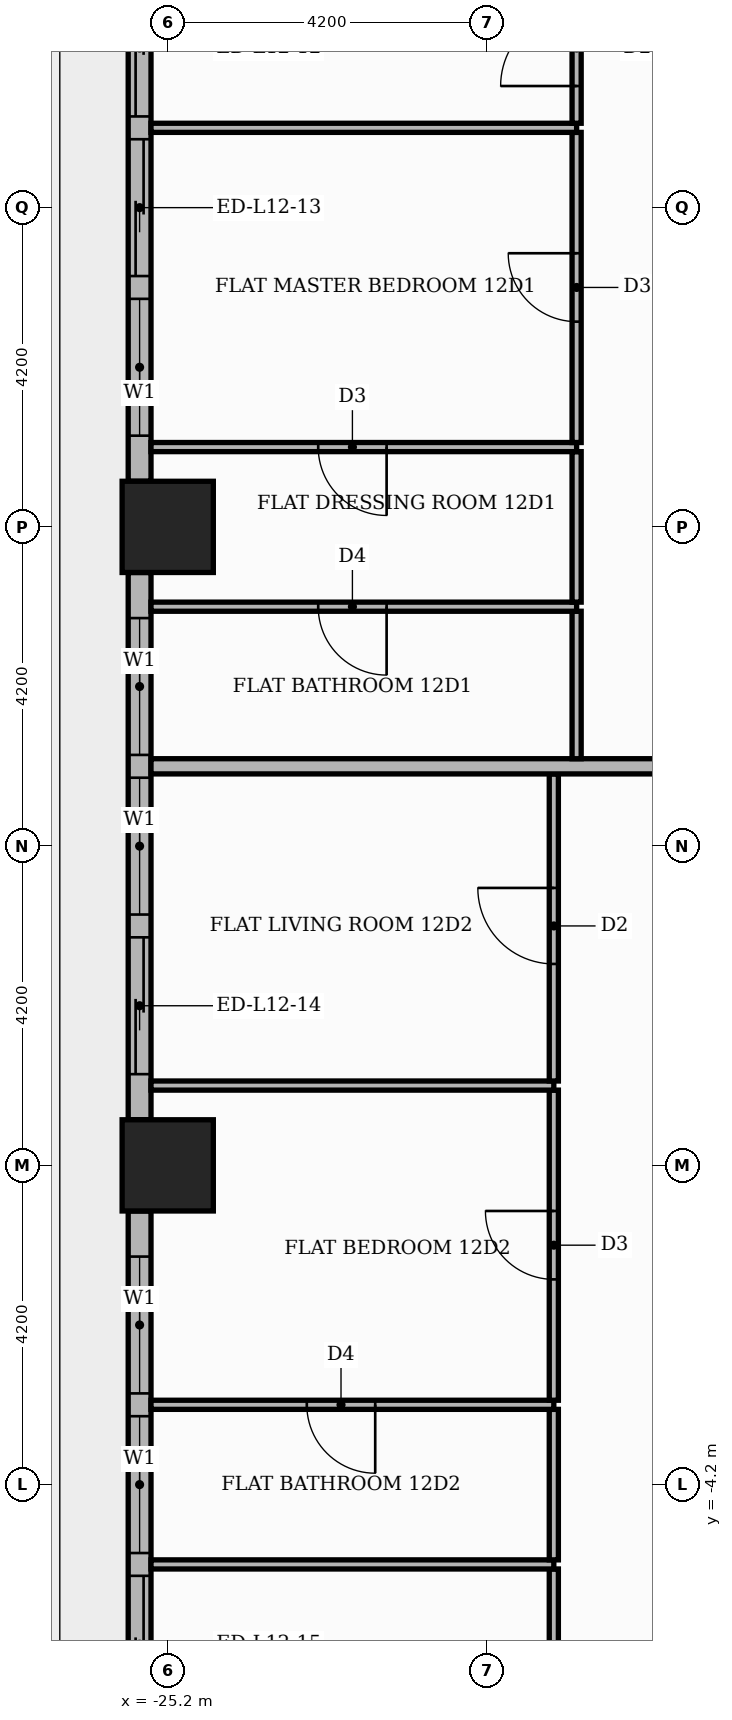
"""IFC4 building model, lengths in metres.
Left out: names, types, materials, properties, quantities, classifications, styles, units other than length and angle.
Written with IfcOpenShell. Run it as: python <this file> out.ifc"""

import sys

from ifc_helpers import new_model, si_unit, direction, frame, frame_2d, origin, origin_2d, place, context, subcontext, project, spatial, rectangle, extrude, element, fill, save


model = new_model("IFC4")
c1 = context("Model", 3, precision=1e-05, world=origin(), true_north=direction((0.0, 1.0)))
c2 = subcontext(c1, "Body", "Model", "MODEL_VIEW")
j1 = project(units=[si_unit("LENGTHUNIT", "METRE"), si_unit("PLANEANGLEUNIT", "RADIAN")], contexts=[c1])
p1 = place(None, origin())
s1 = spatial("IfcSite", under=j1, at=p1, CompositionType="ELEMENT")
p2 = place(p1, origin())
s2 = spatial("IfcBuilding", under=s1, at=p2, CompositionType="ELEMENT")
p3 = place(p2, frame((0.0, 0.0, 54.3)))
s3 = spatial("IfcBuildingStorey", under=s2, at=p3, CompositionType="ELEMENT", Elevation=54.3)
for number, where, z_axis, x_axis in (
    (1, (-25.2, 0.0, 0.0), (0.0, 0.0, 1.0), (1.0, 0.0, 0.0)),
    (2, (-25.2, 8.4, 0.0), (0.0, 0.0, 1.0), (1.0, 0.0, 0.0)),
):
    element("IfcColumn", number, at=place(p3, frame(where, z_axis=z_axis, x_axis=x_axis)), inside=s3, PredefinedType="COLUMN", context=c2, shape_type="SweptSolid", body=[
        extrude(rectangle(XDim=1.2, YDim=1.2, at=origin_2d()), origin(), (0.0, 0.0, 1.0), 3.9),
    ])
p4 = place(p3, frame((-25.57, 16.2, 0.0), z_axis=(0.0, 0.0, 1.0), x_axis=(0.0, -1.0, 0.0)))
e3 = element("IfcWall", 3, at=p4, inside=s3, PredefinedType="STANDARD", context=c2, shape_type="SweptSolid", body=[
    extrude(rectangle(XDim=7.2, YDim=0.3, at=frame_2d((3.6, 0.0))), origin(), (0.0, 0.0, 1.0), 3.48),
])
p5 = place(p4, frame((0.6, 0.0, 0.0)))
e4 = element("IfcOpeningElement", 4, at=p5, cuts=e3, PredefinedType="OPENING", context=c2, shape_type="SweptSolid", body=[
    extrude(rectangle(XDim=1.8, YDim=2.4, at=frame_2d((0.9, 1.2))), frame((0.0, 0.16, 0.0), z_axis=(0.0, -1.0, 0.0), x_axis=(1.0, 0.0, 0.0)), (0.0, 0.0, 1.0), 0.32),
])
p6 = place(p4, frame((2.7, 0.0, 0.0)))
e5 = element("IfcOpeningElement", 5, at=p6, cuts=e3, PredefinedType="OPENING", context=c2, shape_type="SweptSolid", body=[
    extrude(rectangle(XDim=1.8, YDim=2.4, at=frame_2d((0.9, 1.2))), frame((0.0, 0.16, 0.0), z_axis=(0.0, -1.0, 0.0), x_axis=(1.0, 0.0, 0.0)), (0.0, 0.0, 1.0), 0.32),
])
p7 = place(p4, frame((4.8, 0.0, 0.9)))
e6 = element("IfcOpeningElement", 6, at=p7, cuts=e3, PredefinedType="OPENING", context=c2, shape_type="SweptSolid", body=[
    extrude(rectangle(XDim=1.8, YDim=2.1, at=frame_2d((0.9, 1.05))), frame((0.0, 0.16, 0.0), z_axis=(0.0, -1.0, 0.0), x_axis=(1.0, 0.0, 0.0)), (0.0, 0.0, 1.0), 0.32),
])
p8 = place(p3, frame((-25.57, 7.8, 0.0), z_axis=(0.0, 0.0, 1.0), x_axis=(0.0, -1.0, 0.0)))
e7 = element("IfcWall", 7, at=p8, inside=s3, PredefinedType="STANDARD", context=c2, shape_type="SweptSolid", body=[
    extrude(rectangle(XDim=7.2, YDim=0.3, at=frame_2d((3.6, 0.0))), origin(), (0.0, 0.0, 1.0), 3.48),
])
p9 = place(p8, frame((0.6, 0.0, 0.9)))
e8 = element("IfcOpeningElement", 8, at=p9, cuts=e7, PredefinedType="OPENING", context=c2, shape_type="SweptSolid", body=[
    extrude(rectangle(XDim=1.8, YDim=2.1, at=frame_2d((0.9, 1.05))), frame((0.0, 0.16, 0.0), z_axis=(0.0, -1.0, 0.0), x_axis=(1.0, 0.0, 0.0)), (0.0, 0.0, 1.0), 0.32),
])
p10 = place(p8, frame((2.7, 0.0, 0.9)))
e9 = element("IfcOpeningElement", 9, at=p10, cuts=e7, PredefinedType="OPENING", context=c2, shape_type="SweptSolid", body=[
    extrude(rectangle(XDim=1.8, YDim=2.1, at=frame_2d((0.9, 1.05))), frame((0.0, 0.16, 0.0), z_axis=(0.0, -1.0, 0.0), x_axis=(1.0, 0.0, 0.0)), (0.0, 0.0, 1.0), 0.32),
])
p11 = place(p8, frame((4.8, 0.0, 0.0)))
e10 = element("IfcOpeningElement", 10, at=p11, cuts=e7, PredefinedType="OPENING", context=c2, shape_type="SweptSolid", body=[
    extrude(rectangle(XDim=1.8, YDim=2.4, at=frame_2d((0.9, 1.2))), frame((0.0, 0.16, 0.0), z_axis=(0.0, -1.0, 0.0), x_axis=(1.0, 0.0, 0.0)), (0.0, 0.0, 1.0), 0.32),
])
p12 = place(p3, frame((-25.57, -0.6, 0.0), z_axis=(0.0, 0.0, 1.0), x_axis=(0.0, -1.0, 0.0)))
e11 = element("IfcWall", 11, at=p12, inside=s3, PredefinedType="STANDARD", context=c2, shape_type="SweptSolid", body=[
    extrude(rectangle(XDim=7.2, YDim=0.3, at=frame_2d((3.6, 0.0))), origin(), (0.0, 0.0, 1.0), 3.48),
])
p13 = place(p12, frame((0.6, 0.0, 0.9)))
e12 = element("IfcOpeningElement", 12, at=p13, cuts=e11, PredefinedType="OPENING", context=c2, shape_type="SweptSolid", body=[
    extrude(rectangle(XDim=1.8, YDim=2.1, at=frame_2d((0.9, 1.05))), frame((0.0, 0.16, 0.0), z_axis=(0.0, -1.0, 0.0), x_axis=(1.0, 0.0, 0.0)), (0.0, 0.0, 1.0), 0.32),
])
p14 = place(p12, frame((2.7, 0.0, 0.9)))
e13 = element("IfcOpeningElement", 13, at=p14, cuts=e11, PredefinedType="OPENING", context=c2, shape_type="SweptSolid", body=[
    extrude(rectangle(XDim=1.8, YDim=2.1, at=frame_2d((0.9, 1.05))), frame((0.0, 0.16, 0.0), z_axis=(0.0, -1.0, 0.0), x_axis=(1.0, 0.0, 0.0)), (0.0, 0.0, 1.0), 0.32),
])
p15 = place(p12, frame((4.8, 0.0, 0.0)))
e14 = element("IfcOpeningElement", 14, at=p15, cuts=e11, PredefinedType="OPENING", context=c2, shape_type="SweptSolid", body=[
    extrude(rectangle(XDim=1.8, YDim=2.4, at=frame_2d((0.9, 1.2))), frame((0.0, 0.16, 0.0), z_axis=(0.0, -1.0, 0.0), x_axis=(1.0, 0.0, 0.0)), (0.0, 0.0, 1.0), 0.32),
])
p16 = place(p3, frame((-20.12, -9.39, 0.0), z_axis=(0.0, 0.0, 1.0), x_axis=(0.0, 1.0, 0.0)))
e15 = element("IfcWall", 15, at=p16, inside=s3, PredefinedType="PARTITIONING", context=c2, shape_type="SweptSolid", body=[
    extrude(rectangle(XDim=4.08, YDim=0.12, at=frame_2d((2.04, 0.0))), origin(), (0.0, 0.0, 1.0), 3.48),
])
p17 = place(p16, frame((1.59, 0.0, 0.0)))
e16 = element("IfcOpeningElement", 16, at=p17, cuts=e15, PredefinedType="OPENING", context=c2, shape_type="SweptSolid", body=[
    extrude(rectangle(XDim=0.9, YDim=2.1, at=frame_2d((0.45, 1.05))), frame((0.0, 0.07, 0.0), z_axis=(0.0, -1.0, 0.0), x_axis=(1.0, 0.0, 0.0)), (0.0, 0.0, 1.0), 0.14),
])
p18 = place(p3, frame((-25.42, -5.25, 0.0), z_axis=(0.0, 0.0, 1.0), x_axis=(1.0, 0.0, 0.0)))
e17 = element("IfcWall", 17, at=p18, inside=s3, PredefinedType="PARTITIONING", context=c2, shape_type="SweptSolid", body=[
    extrude(rectangle(XDim=5.3, YDim=0.12, at=frame_2d((2.65, 0.0))), origin(), (0.0, 0.0, 1.0), 3.48),
])
p19 = place(p3, frame((-20.12, -5.19, 0.0), z_axis=(0.0, 0.0, 1.0), x_axis=(0.0, 1.0, 0.0)))
e18 = element("IfcWall", 18, at=p19, inside=s3, PredefinedType="PARTITIONING", context=c2, shape_type="SweptSolid", body=[
    extrude(rectangle(XDim=1.98, YDim=0.12, at=frame_2d((0.99, 0.0))), origin(), (0.0, 0.0, 1.0), 3.48),
])
p20 = place(p3, frame((-25.42, -3.15, 0.0), z_axis=(0.0, 0.0, 1.0), x_axis=(1.0, 0.0, 0.0)))
e19 = element("IfcWall", 19, at=p20, inside=s3, PredefinedType="PARTITIONING", context=c2, shape_type="SweptSolid", body=[
    extrude(rectangle(XDim=5.3, YDim=0.12, at=frame_2d((2.65, 0.0))), origin(), (0.0, 0.0, 1.0), 3.48),
])
p21 = place(p20, frame((2.05, 0.0, 0.0)))
e20 = element("IfcOpeningElement", 20, at=p21, cuts=e19, PredefinedType="OPENING", context=c2, shape_type="SweptSolid", body=[
    extrude(rectangle(XDim=0.9, YDim=2.1, at=frame_2d((0.45, 1.05))), frame((0.0, 0.07, 0.0), z_axis=(0.0, -1.0, 0.0), x_axis=(1.0, 0.0, 0.0)), (0.0, 0.0, 1.0), 0.14),
])
p22 = place(p3, frame((-20.12, -3.09, 0.0), z_axis=(0.0, 0.0, 1.0), x_axis=(0.0, 1.0, 0.0)))
e21 = element("IfcWall", 21, at=p22, inside=s3, PredefinedType="PARTITIONING", context=c2, shape_type="SweptSolid", body=[
    extrude(rectangle(XDim=4.08, YDim=0.12, at=frame_2d((2.04, 0.0))), origin(), (0.0, 0.0, 1.0), 3.48),
])
p23 = place(p22, frame((1.59, 0.0, 0.0)))
e22 = element("IfcOpeningElement", 22, at=p23, cuts=e21, PredefinedType="OPENING", context=c2, shape_type="SweptSolid", body=[
    extrude(rectangle(XDim=0.9, YDim=2.1, at=frame_2d((0.45, 1.05))), frame((0.0, 0.07, 0.0), z_axis=(0.0, -1.0, 0.0), x_axis=(1.0, 0.0, 0.0)), (0.0, 0.0, 1.0), 0.14),
])
p24 = place(p3, frame((-25.42, 1.05, 0.0), z_axis=(0.0, 0.0, 1.0), x_axis=(1.0, 0.0, 0.0)))
e23 = element("IfcWall", 23, at=p24, inside=s3, PredefinedType="PARTITIONING", context=c2, shape_type="SweptSolid", body=[
    extrude(rectangle(XDim=5.3, YDim=0.12, at=frame_2d((2.65, 0.0))), origin(), (0.0, 0.0, 1.0), 3.48),
])
p25 = place(p3, frame((-20.12, 1.11, 0.0), z_axis=(0.0, 0.0, 1.0), x_axis=(0.0, 1.0, 0.0)))
e24 = element("IfcWall", 24, at=p25, inside=s3, PredefinedType="PARTITIONING", context=c2, shape_type="SweptSolid", body=[
    extrude(rectangle(XDim=4.04, YDim=0.12, at=frame_2d((2.02, 0.0))), origin(), (0.0, 0.0, 1.0), 3.48),
])
p26 = place(p25, frame((1.54, 0.0, 0.0)))
e25 = element("IfcOpeningElement", 25, at=p26, cuts=e24, PredefinedType="OPENING", context=c2, shape_type="SweptSolid", body=[
    extrude(rectangle(XDim=1.0, YDim=2.1, at=frame_2d((0.5, 1.05))), frame((0.0, 0.07, 0.0), z_axis=(0.0, -1.0, 0.0), x_axis=(1.0, 0.0, 0.0)), (0.0, 0.0, 1.0), 0.14),
])
p27 = place(p3, frame((-25.42, 5.25, 0.0), z_axis=(0.0, 0.0, 1.0), x_axis=(1.0, 0.0, 0.0)))
e26 = element("IfcWall", 26, at=p27, inside=s3, PredefinedType="PARTITIONING", context=c2, shape_type="SweptSolid", body=[
    extrude(rectangle(XDim=11.77, YDim=0.2, at=frame_2d((5.885, 0.0))), origin(), (0.0, 0.0, 1.0), 3.48),
])
p28 = place(p3, frame((-19.82, 5.35, 0.0), z_axis=(0.0, 0.0, 1.0), x_axis=(0.0, 1.0, 0.0)))
e27 = element("IfcWall", 27, at=p28, inside=s3, PredefinedType="PARTITIONING", context=c2, shape_type="SweptSolid", body=[
    extrude(rectangle(XDim=1.94, YDim=0.12, at=frame_2d((0.97, 0.0))), origin(), (0.0, 0.0, 1.0), 3.48),
])
p29 = place(p3, frame((-25.42, 7.35, 0.0), z_axis=(0.0, 0.0, 1.0), x_axis=(1.0, 0.0, 0.0)))
e28 = element("IfcWall", 28, at=p29, inside=s3, PredefinedType="PARTITIONING", context=c2, shape_type="SweptSolid", body=[
    extrude(rectangle(XDim=5.6, YDim=0.12, at=frame_2d((2.8, 0.0))), origin(), (0.0, 0.0, 1.0), 3.48),
])
p30 = place(p29, frame((2.2, 0.0, 0.0)))
e29 = element("IfcOpeningElement", 29, at=p30, cuts=e28, PredefinedType="OPENING", context=c2, shape_type="SweptSolid", body=[
    extrude(rectangle(XDim=0.9, YDim=2.1, at=frame_2d((0.45, 1.05))), frame((0.0, 0.07, 0.0), z_axis=(0.0, -1.0, 0.0), x_axis=(1.0, 0.0, 0.0)), (0.0, 0.0, 1.0), 0.14),
])
p31 = place(p3, frame((-19.82, 7.41, 0.0), z_axis=(0.0, 0.0, 1.0), x_axis=(0.0, 1.0, 0.0)))
e30 = element("IfcWall", 30, at=p31, inside=s3, PredefinedType="PARTITIONING", context=c2, shape_type="SweptSolid", body=[
    extrude(rectangle(XDim=1.98, YDim=0.12, at=frame_2d((0.99, 0.0))), origin(), (0.0, 0.0, 1.0), 3.48),
])
p32 = place(p3, frame((-25.42, 9.45, 0.0), z_axis=(0.0, 0.0, 1.0), x_axis=(1.0, 0.0, 0.0)))
e31 = element("IfcWall", 31, at=p32, inside=s3, PredefinedType="PARTITIONING", context=c2, shape_type="SweptSolid", body=[
    extrude(rectangle(XDim=5.6, YDim=0.12, at=frame_2d((2.8, 0.0))), origin(), (0.0, 0.0, 1.0), 3.48),
])
p33 = place(p32, frame((2.2, 0.0, 0.0)))
e32 = element("IfcOpeningElement", 32, at=p33, cuts=e31, PredefinedType="OPENING", context=c2, shape_type="SweptSolid", body=[
    extrude(rectangle(XDim=0.9, YDim=2.1, at=frame_2d((0.45, 1.05))), frame((0.0, 0.07, 0.0), z_axis=(0.0, -1.0, 0.0), x_axis=(1.0, 0.0, 0.0)), (0.0, 0.0, 1.0), 0.14),
])
p34 = place(p3, frame((-19.82, 9.51, 0.0), z_axis=(0.0, 0.0, 1.0), x_axis=(0.0, 1.0, 0.0)))
e33 = element("IfcWall", 33, at=p34, inside=s3, PredefinedType="PARTITIONING", context=c2, shape_type="SweptSolid", body=[
    extrude(rectangle(XDim=4.08, YDim=0.12, at=frame_2d((2.04, 0.0))), origin(), (0.0, 0.0, 1.0), 3.48),
])
p35 = place(p34, frame((1.59, 0.0, 0.0)))
e34 = element("IfcOpeningElement", 34, at=p35, cuts=e33, PredefinedType="OPENING", context=c2, shape_type="SweptSolid", body=[
    extrude(rectangle(XDim=0.9, YDim=2.1, at=frame_2d((0.45, 1.05))), frame((0.0, 0.07, 0.0), z_axis=(0.0, -1.0, 0.0), x_axis=(1.0, 0.0, 0.0)), (0.0, 0.0, 1.0), 0.14),
])
p36 = place(p3, frame((-25.42, 13.65, 0.0), z_axis=(0.0, 0.0, 1.0), x_axis=(1.0, 0.0, 0.0)))
e35 = element("IfcWall", 35, at=p36, inside=s3, PredefinedType="PARTITIONING", context=c2, shape_type="SweptSolid", body=[
    extrude(rectangle(XDim=5.6, YDim=0.12, at=frame_2d((2.8, 0.0))), origin(), (0.0, 0.0, 1.0), 3.48),
])
p37 = place(p3, frame((-19.82, 13.71, 0.0), z_axis=(0.0, 0.0, 1.0), x_axis=(0.0, 1.0, 0.0)))
e36 = element("IfcWall", 36, at=p37, inside=s3, PredefinedType="PARTITIONING", context=c2, shape_type="SweptSolid", body=[
    extrude(rectangle(XDim=1.98, YDim=0.12, at=frame_2d((0.99, 0.0))), origin(), (0.0, 0.0, 1.0), 3.48),
])
p38 = place(p37, frame((0.49, 0.0, 0.0)))
e37 = element("IfcOpeningElement", 37, at=p38, cuts=e36, PredefinedType="OPENING", context=c2, shape_type="SweptSolid", body=[
    extrude(rectangle(XDim=1.0, YDim=2.1, at=frame_2d((0.5, 1.05))), frame((0.0, 0.07, 0.0), z_axis=(0.0, -1.0, 0.0), x_axis=(1.0, 0.0, 0.0)), (0.0, 0.0, 1.0), 0.14),
])
p39 = place(p5, origin())
e38 = element("IfcDoor", 38, at=p39, inside=s3, OperationType="SLIDING_TO_LEFT", PredefinedType="DOOR", context=c2, shape_type="SweptSolid", body=[
    extrude(rectangle(XDim=1.8, YDim=2.4, at=frame_2d((0.9, 1.2))), frame((0.0, 0.025, 0.0), z_axis=(0.0, -1.0, 0.0), x_axis=(1.0, 0.0, 0.0)), (0.0, 0.0, 1.0), 0.05),
])
fill(e4, e38)
p40 = place(p6, origin())
e39 = element("IfcDoor", 39, at=p40, inside=s3, OperationType="SLIDING_TO_RIGHT", PredefinedType="DOOR", context=c2, shape_type="SweptSolid", body=[
    extrude(rectangle(XDim=1.8, YDim=2.4, at=frame_2d((0.9, 1.2))), frame((0.0, 0.025, 0.0), z_axis=(0.0, -1.0, 0.0), x_axis=(1.0, 0.0, 0.0)), (0.0, 0.0, 1.0), 0.05),
])
fill(e5, e39)
p41 = place(p7, origin())
e40 = element("IfcWindow", 40, at=p41, inside=s3, PartitioningType="SINGLE_PANEL", PredefinedType="WINDOW", context=c2, shape_type="SweptSolid", body=[
    extrude(rectangle(XDim=1.8, YDim=2.1, at=frame_2d((0.9, 1.05))), frame((0.0, 0.03, 0.0), z_axis=(0.0, -1.0, 0.0), x_axis=(1.0, 0.0, 0.0)), (0.0, 0.0, 1.0), 0.06),
])
fill(e6, e40)
p42 = place(p9, origin())
e41 = element("IfcWindow", 41, at=p42, inside=s3, PartitioningType="SINGLE_PANEL", PredefinedType="WINDOW", context=c2, shape_type="SweptSolid", body=[
    extrude(rectangle(XDim=1.8, YDim=2.1, at=frame_2d((0.9, 1.05))), frame((0.0, 0.03, 0.0), z_axis=(0.0, -1.0, 0.0), x_axis=(1.0, 0.0, 0.0)), (0.0, 0.0, 1.0), 0.06),
])
fill(e8, e41)
p43 = place(p10, origin())
e42 = element("IfcWindow", 42, at=p43, inside=s3, PartitioningType="SINGLE_PANEL", PredefinedType="WINDOW", context=c2, shape_type="SweptSolid", body=[
    extrude(rectangle(XDim=1.8, YDim=2.1, at=frame_2d((0.9, 1.05))), frame((0.0, 0.03, 0.0), z_axis=(0.0, -1.0, 0.0), x_axis=(1.0, 0.0, 0.0)), (0.0, 0.0, 1.0), 0.06),
])
fill(e9, e42)
p44 = place(p11, origin())
e43 = element("IfcDoor", 43, at=p44, inside=s3, OperationType="SLIDING_TO_RIGHT", PredefinedType="DOOR", context=c2, shape_type="SweptSolid", body=[
    extrude(rectangle(XDim=1.8, YDim=2.4, at=frame_2d((0.9, 1.2))), frame((0.0, 0.025, 0.0), z_axis=(0.0, -1.0, 0.0), x_axis=(1.0, 0.0, 0.0)), (0.0, 0.0, 1.0), 0.05),
])
fill(e10, e43)
p45 = place(p13, origin())
e44 = element("IfcWindow", 44, at=p45, inside=s3, PartitioningType="SINGLE_PANEL", PredefinedType="WINDOW", context=c2, shape_type="SweptSolid", body=[
    extrude(rectangle(XDim=1.8, YDim=2.1, at=frame_2d((0.9, 1.05))), frame((0.0, 0.03, 0.0), z_axis=(0.0, -1.0, 0.0), x_axis=(1.0, 0.0, 0.0)), (0.0, 0.0, 1.0), 0.06),
])
fill(e12, e44)
p46 = place(p14, origin())
e45 = element("IfcWindow", 45, at=p46, inside=s3, PartitioningType="SINGLE_PANEL", PredefinedType="WINDOW", context=c2, shape_type="SweptSolid", body=[
    extrude(rectangle(XDim=1.8, YDim=2.1, at=frame_2d((0.9, 1.05))), frame((0.0, 0.03, 0.0), z_axis=(0.0, -1.0, 0.0), x_axis=(1.0, 0.0, 0.0)), (0.0, 0.0, 1.0), 0.06),
])
fill(e13, e45)
p47 = place(p15, origin())
e46 = element("IfcDoor", 46, at=p47, inside=s3, OperationType="SLIDING_TO_RIGHT", PredefinedType="DOOR", context=c2, shape_type="SweptSolid", body=[
    extrude(rectangle(XDim=1.8, YDim=2.4, at=frame_2d((0.9, 1.2))), frame((0.0, 0.025, 0.0), z_axis=(0.0, -1.0, 0.0), x_axis=(1.0, 0.0, 0.0)), (0.0, 0.0, 1.0), 0.05),
])
fill(e14, e46)
p48 = place(p38, origin())
e47 = element("IfcDoor", 47, at=p48, inside=s3, OperationType="SINGLE_SWING_LEFT", PredefinedType="DOOR", context=c2, shape_type="SweptSolid", body=[
    extrude(rectangle(XDim=1.0, YDim=2.1, at=frame_2d((0.5, 1.05))), frame((0.0, 0.025, 0.0), z_axis=(0.0, -1.0, 0.0), x_axis=(1.0, 0.0, 0.0)), (0.0, 0.0, 1.0), 0.05),
])
fill(e37, e47)
p49 = place(p35, origin())
e48 = element("IfcDoor", 48, at=p49, inside=s3, OperationType="SINGLE_SWING_RIGHT", PredefinedType="DOOR", context=c2, shape_type="SweptSolid", body=[
    extrude(rectangle(XDim=0.9, YDim=2.1, at=frame_2d((0.45, 1.05))), frame((0.0, 0.025, 0.0), z_axis=(0.0, -1.0, 0.0), x_axis=(1.0, 0.0, 0.0)), (0.0, 0.0, 1.0), 0.05),
])
fill(e34, e48)
p50 = place(p33, frame((0.9, 0.0, 0.0), z_axis=(0.0, 0.0, 1.0), x_axis=(-1.0, 0.0, 0.0)))
e49 = element("IfcDoor", 49, at=p50, inside=s3, OperationType="SINGLE_SWING_RIGHT", PredefinedType="DOOR", context=c2, shape_type="SweptSolid", body=[
    extrude(rectangle(XDim=0.9, YDim=2.1, at=frame_2d((0.45, 1.05))), frame((0.0, 0.025, 0.0), z_axis=(0.0, -1.0, 0.0), x_axis=(1.0, 0.0, 0.0)), (0.0, 0.0, 1.0), 0.05),
])
fill(e32, e49)
p51 = place(p30, frame((0.9, 0.0, 0.0), z_axis=(0.0, 0.0, 1.0), x_axis=(-1.0, 0.0, 0.0)))
e50 = element("IfcDoor", 50, at=p51, inside=s3, OperationType="SINGLE_SWING_RIGHT", PredefinedType="DOOR", context=c2, shape_type="SweptSolid", body=[
    extrude(rectangle(XDim=0.9, YDim=2.1, at=frame_2d((0.45, 1.05))), frame((0.0, 0.025, 0.0), z_axis=(0.0, -1.0, 0.0), x_axis=(1.0, 0.0, 0.0)), (0.0, 0.0, 1.0), 0.05),
])
fill(e29, e50)
p52 = place(p26, origin())
e51 = element("IfcDoor", 51, at=p52, inside=s3, OperationType="SINGLE_SWING_RIGHT", PredefinedType="DOOR", context=c2, shape_type="SweptSolid", body=[
    extrude(rectangle(XDim=1.0, YDim=2.1, at=frame_2d((0.5, 1.05))), frame((0.0, 0.025, 0.0), z_axis=(0.0, -1.0, 0.0), x_axis=(1.0, 0.0, 0.0)), (0.0, 0.0, 1.0), 0.05),
])
fill(e25, e51)
p53 = place(p23, origin())
e52 = element("IfcDoor", 52, at=p53, inside=s3, OperationType="SINGLE_SWING_RIGHT", PredefinedType="DOOR", context=c2, shape_type="SweptSolid", body=[
    extrude(rectangle(XDim=0.9, YDim=2.1, at=frame_2d((0.45, 1.05))), frame((0.0, 0.025, 0.0), z_axis=(0.0, -1.0, 0.0), x_axis=(1.0, 0.0, 0.0)), (0.0, 0.0, 1.0), 0.05),
])
fill(e22, e52)
p54 = place(p21, frame((0.9, 0.0, 0.0), z_axis=(0.0, 0.0, 1.0), x_axis=(-1.0, 0.0, 0.0)))
e53 = element("IfcDoor", 53, at=p54, inside=s3, OperationType="SINGLE_SWING_RIGHT", PredefinedType="DOOR", context=c2, shape_type="SweptSolid", body=[
    extrude(rectangle(XDim=0.9, YDim=2.1, at=frame_2d((0.45, 1.05))), frame((0.0, 0.025, 0.0), z_axis=(0.0, -1.0, 0.0), x_axis=(1.0, 0.0, 0.0)), (0.0, 0.0, 1.0), 0.05),
])
fill(e20, e53)
save(model, sys.argv[1])
